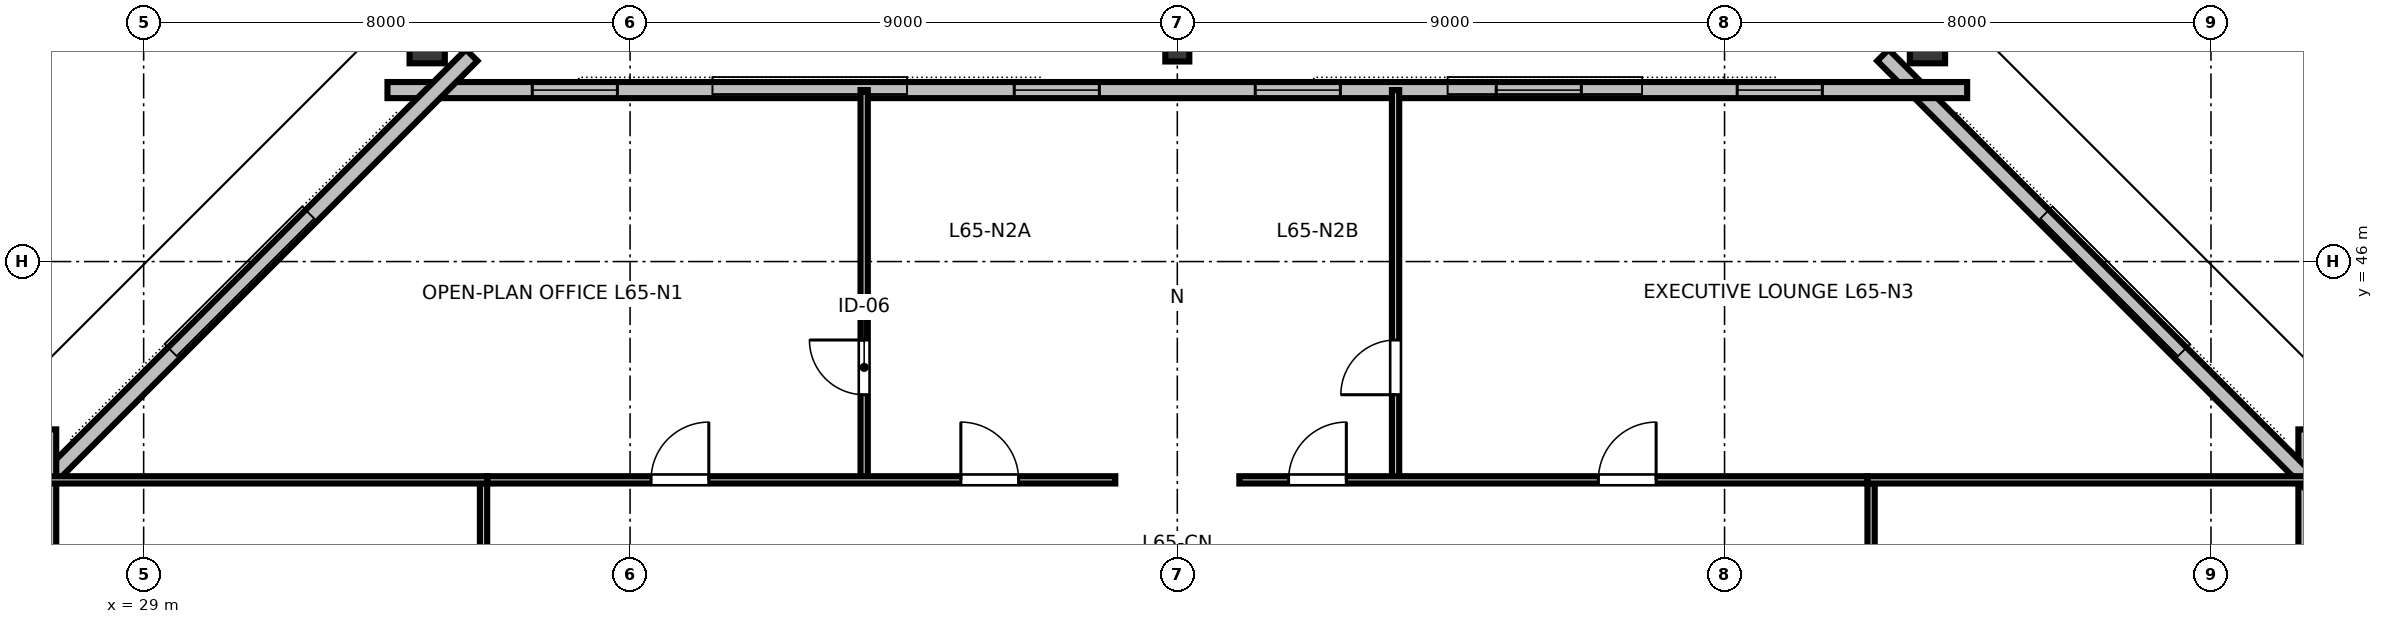
"""IFC4 building model, lengths in metres.
Left out: names, types, materials, properties, quantities, classifications, styles, units other than length and angle.
Written with IfcOpenShell. Run it as: python <this file> out.ifc"""

import sys

from ifc_helpers import new_model, si_unit, direction, frame, frame_2d, origin, origin_2d, place, context, subcontext, project, spatial, rectangle, hollow_rectangle, i_section, extrude, element, fill, save


model = new_model("IFC4")
c1 = context("Model", 3, precision=1e-05, world=origin(), true_north=direction((0.0, 1.0)))
c2 = subcontext(c1, "Body", "Model", "MODEL_VIEW")
j1 = project(units=[si_unit("LENGTHUNIT", "METRE"), si_unit("PLANEANGLEUNIT", "RADIAN")], contexts=[c1])
p1 = place(None, origin())
s1 = spatial("IfcSite", under=j1, at=p1, CompositionType="ELEMENT")
p2 = place(p1, origin())
s2 = spatial("IfcBuilding", under=s1, at=p2, CompositionType="ELEMENT")
p3 = place(p2, frame((0.0, 0.0, 246.6)))
s3 = spatial("IfcBuildingStorey", under=s2, at=p3, CompositionType="ELEMENT", Elevation=246.6)
p4 = place(p3, frame((65.32, 42.652, 0.0), z_axis=(-0.177670579794, -0.155655183327, 0.971701923935), x_axis=(0.730885754555, 0.640320734295, 0.236210438002)))
e1 = element("IfcColumn", 1, at=p4, inside=s3, PredefinedType="COLUMN", context=c2, shape_type="SweptSolid", body=[
    extrude(hollow_rectangle(XDim=0.58, YDim=0.7, WallThickness=0.032, at=origin_2d()), origin(), (0.0, 0.0, 1.0), 3.471),
])
p5 = place(p3, frame((58.337, 49.61, 0.0), z_axis=(-0.205244558331, -0.127417395213, 0.970381099709), x_axis=(0.527435237424, -0.849595239113, 0.0)))
e2 = element("IfcColumn", 2, at=p5, inside=s3, PredefinedType="COLUMN", context=c2, shape_type="SweptSolid", body=[
    extrude(hollow_rectangle(XDim=0.58, YDim=0.7, WallThickness=0.032, at=origin_2d()), origin(), (0.0, 0.0, 1.0), 3.476),
])
p6 = place(p3, frame((46.0, 49.48, 0.0), z_axis=(0.0, -0.128283388035, 0.991737552155), x_axis=(1.0, 0.0, 0.0)))
e3 = element("IfcColumn", 3, at=p6, inside=s3, PredefinedType="COLUMN", context=c2, shape_type="SweptSolid", body=[
    extrude(i_section(OverallWidth=0.395, OverallDepth=0.38, WebThickness=0.019, FlangeThickness=0.03, FilletRadius=0.025, at=origin_2d()), origin(), (0.0, 0.0, 1.0), 3.401),
])
p7 = place(p3, frame((33.663, 49.61, 0.0), z_axis=(0.205244558331, -0.127417395213, 0.970381099709), x_axis=(0.527435237424, 0.849595239113, 0.0)))
e4 = element("IfcColumn", 4, at=p7, inside=s3, PredefinedType="COLUMN", context=c2, shape_type="SweptSolid", body=[
    extrude(hollow_rectangle(XDim=0.58, YDim=0.7, WallThickness=0.032, at=origin_2d()), origin(), (0.0, 0.0, 1.0), 3.476),
])
p8 = place(p3, frame((26.68, 42.652, 0.0), z_axis=(0.177670579794, -0.155655183327, 0.971701923935), x_axis=(-0.730885754555, 0.640320734295, 0.236210438002)))
e5 = element("IfcColumn", 5, at=p8, inside=s3, PredefinedType="COLUMN", context=c2, shape_type="SweptSolid", body=[
    extrude(hollow_rectangle(XDim=0.58, YDim=0.7, WallThickness=0.032, at=origin_2d()), origin(), (0.0, 0.0, 1.0), 3.471),
])
p9 = place(p3, frame((64.57, 20.76, 0.0), z_axis=(0.0, 0.0, 1.0), x_axis=(0.0, 1.0, 0.0)))
e6 = element("IfcWall", 6, at=p9, inside=s3, PredefinedType="STANDARD", context=c2, shape_type="SweptSolid", body=[
    extrude(rectangle(XDim=22.48, YDim=0.265, at=frame_2d((11.24, 0.0))), origin(), (0.0, 0.0, 1.0), 2.832),
])
p10 = place(p9, frame((2.428, 0.0, 0.85)))
e7 = element("IfcOpeningElement", 7, at=p10, cuts=e6, PredefinedType="OPENING", context=c2, shape_type="SweptSolid", body=[
    extrude(rectangle(XDim=1.4, YDim=1.2, at=frame_2d((0.7, 0.6))), frame((0.0, 0.142, 0.0), z_axis=(0.0, -1.0, 0.0), x_axis=(1.0, 0.0, 0.0)), (0.0, 0.0, 1.0), 0.285),
])
p11 = place(p9, frame((6.484, 0.0, 0.85)))
e8 = element("IfcOpeningElement", 8, at=p11, cuts=e6, PredefinedType="OPENING", context=c2, shape_type="SweptSolid", body=[
    extrude(rectangle(XDim=1.4, YDim=1.2, at=frame_2d((0.7, 0.6))), frame((0.0, 0.142, 0.0), z_axis=(0.0, -1.0, 0.0), x_axis=(1.0, 0.0, 0.0)), (0.0, 0.0, 1.0), 0.285),
])
p12 = place(p9, frame((14.596, 0.0, 0.85)))
e9 = element("IfcOpeningElement", 9, at=p12, cuts=e6, PredefinedType="OPENING", context=c2, shape_type="SweptSolid", body=[
    extrude(rectangle(XDim=1.4, YDim=1.2, at=frame_2d((0.7, 0.6))), frame((0.0, 0.142, 0.0), z_axis=(0.0, -1.0, 0.0), x_axis=(1.0, 0.0, 0.0)), (0.0, 0.0, 1.0), 0.285),
])
p13 = place(p9, frame((18.652, 0.0, 0.85)))
e10 = element("IfcOpeningElement", 10, at=p13, cuts=e6, PredefinedType="OPENING", context=c2, shape_type="SweptSolid", body=[
    extrude(rectangle(XDim=1.4, YDim=1.2, at=frame_2d((0.7, 0.6))), frame((0.0, 0.142, 0.0), z_axis=(0.0, -1.0, 0.0), x_axis=(1.0, 0.0, 0.0)), (0.0, 0.0, 1.0), 0.285),
])
p14 = place(p3, frame((65.144, 41.854, 0.0), z_axis=(0.0, 0.0, 1.0), x_axis=(-0.707106781187, 0.707106781187, 0.0)))
e11 = element("IfcWall", 11, at=p14, inside=s3, PredefinedType="STANDARD", context=c2, shape_type="SweptSolid", body=[
    extrude(rectangle(XDim=10.662, YDim=0.265, at=frame_2d((5.331, 0.0))), origin(), (0.0, 0.0, 1.0), 2.832),
])
p15 = place(p3, frame((58.99, 48.82, 0.0), z_axis=(0.0, 0.0, 1.0), x_axis=(-1.0, 0.0, 0.0)))
e12 = element("IfcWall", 12, at=p15, inside=s3, PredefinedType="STANDARD", context=c2, shape_type="SweptSolid", body=[
    extrude(rectangle(XDim=25.98, YDim=0.265, at=frame_2d((12.99, 0.0))), origin(), (0.0, 0.0, 1.0), 2.832),
])
p16 = place(p15, frame((2.382, 0.0, 0.85)))
e13 = element("IfcOpeningElement", 13, at=p16, cuts=e12, PredefinedType="OPENING", context=c2, shape_type="SweptSolid", body=[
    extrude(rectangle(XDim=1.4, YDim=1.2, at=frame_2d((0.7, 0.6))), frame((0.0, 0.142, 0.0), z_axis=(0.0, -1.0, 0.0), x_axis=(1.0, 0.0, 0.0)), (0.0, 0.0, 1.0), 0.285),
])
p17 = place(p15, frame((6.345, 0.0, 0.85)))
e14 = element("IfcOpeningElement", 14, at=p17, cuts=e12, PredefinedType="OPENING", context=c2, shape_type="SweptSolid", body=[
    extrude(rectangle(XDim=1.4, YDim=1.2, at=frame_2d((0.7, 0.6))), frame((0.0, 0.142, 0.0), z_axis=(0.0, -1.0, 0.0), x_axis=(1.0, 0.0, 0.0)), (0.0, 0.0, 1.0), 0.285),
])
p18 = place(p15, frame((10.308, 0.0, 0.85)))
e15 = element("IfcOpeningElement", 15, at=p18, cuts=e12, PredefinedType="OPENING", context=c2, shape_type="SweptSolid", body=[
    extrude(rectangle(XDim=1.4, YDim=1.2, at=frame_2d((0.7, 0.6))), frame((0.0, 0.142, 0.0), z_axis=(0.0, -1.0, 0.0), x_axis=(1.0, 0.0, 0.0)), (0.0, 0.0, 1.0), 0.285),
])
p19 = place(p15, frame((14.272, 0.0, 0.85)))
e16 = element("IfcOpeningElement", 16, at=p19, cuts=e12, PredefinedType="OPENING", context=c2, shape_type="SweptSolid", body=[
    extrude(rectangle(XDim=1.4, YDim=1.2, at=frame_2d((0.7, 0.6))), frame((0.0, 0.142, 0.0), z_axis=(0.0, -1.0, 0.0), x_axis=(1.0, 0.0, 0.0)), (0.0, 0.0, 1.0), 0.285),
])
p20 = place(p15, frame((22.198, 0.0, 0.85)))
e17 = element("IfcOpeningElement", 17, at=p20, cuts=e12, PredefinedType="OPENING", context=c2, shape_type="SweptSolid", body=[
    extrude(rectangle(XDim=1.4, YDim=1.2, at=frame_2d((0.7, 0.6))), frame((0.0, 0.142, 0.0), z_axis=(0.0, -1.0, 0.0), x_axis=(1.0, 0.0, 0.0)), (0.0, 0.0, 1.0), 0.285),
])
p21 = place(p3, frame((34.396, 49.394, 0.0), z_axis=(0.0, 0.0, 1.0), x_axis=(-0.707106781187, -0.707106781187, 0.0)))
e18 = element("IfcWall", 18, at=p21, inside=s3, PredefinedType="STANDARD", context=c2, shape_type="SweptSolid", body=[
    extrude(rectangle(XDim=10.662, YDim=0.265, at=frame_2d((5.331, 0.0))), origin(), (0.0, 0.0, 1.0), 2.832),
])
p22 = place(p3, frame((27.43, 43.24, 0.0), z_axis=(0.0, 0.0, 1.0), x_axis=(0.0, -1.0, 0.0)))
e19 = element("IfcWall", 19, at=p22, inside=s3, PredefinedType="STANDARD", context=c2, shape_type="SweptSolid", body=[
    extrude(rectangle(XDim=22.48, YDim=0.265, at=frame_2d((11.24, 0.0))), origin(), (0.0, 0.0, 1.0), 2.832),
])
p23 = place(p22, frame((2.428, 0.0, 0.85)))
e20 = element("IfcOpeningElement", 20, at=p23, cuts=e19, PredefinedType="OPENING", context=c2, shape_type="SweptSolid", body=[
    extrude(rectangle(XDim=1.4, YDim=1.2, at=frame_2d((0.7, 0.6))), frame((0.0, 0.142, 0.0), z_axis=(0.0, -1.0, 0.0), x_axis=(1.0, 0.0, 0.0)), (0.0, 0.0, 1.0), 0.285),
])
p24 = place(p22, frame((6.484, 0.0, 0.85)))
e21 = element("IfcOpeningElement", 21, at=p24, cuts=e19, PredefinedType="OPENING", context=c2, shape_type="SweptSolid", body=[
    extrude(rectangle(XDim=1.4, YDim=1.2, at=frame_2d((0.7, 0.6))), frame((0.0, 0.142, 0.0), z_axis=(0.0, -1.0, 0.0), x_axis=(1.0, 0.0, 0.0)), (0.0, 0.0, 1.0), 0.285),
])
p25 = place(p22, frame((14.596, 0.0, 0.85)))
e22 = element("IfcOpeningElement", 22, at=p25, cuts=e19, PredefinedType="OPENING", context=c2, shape_type="SweptSolid", body=[
    extrude(rectangle(XDim=1.4, YDim=1.2, at=frame_2d((0.7, 0.6))), frame((0.0, 0.142, 0.0), z_axis=(0.0, -1.0, 0.0), x_axis=(1.0, 0.0, 0.0)), (0.0, 0.0, 1.0), 0.285),
])
p26 = place(p22, frame((18.652, 0.0, 0.85)))
e23 = element("IfcOpeningElement", 23, at=p26, cuts=e19, PredefinedType="OPENING", context=c2, shape_type="SweptSolid", body=[
    extrude(rectangle(XDim=1.4, YDim=1.2, at=frame_2d((0.7, 0.6))), frame((0.0, 0.142, 0.0), z_axis=(0.0, -1.0, 0.0), x_axis=(1.0, 0.0, 0.0)), (0.0, 0.0, 1.0), 0.285),
])
p27 = place(p3, frame((40.85, 42.41, 0.0), z_axis=(0.0, 0.0, 1.0), x_axis=(0.0, 1.0, 0.0)))
e24 = element("IfcWall", 24, at=p27, inside=s3, PredefinedType="PARTITIONING", context=c2, shape_type="SweptSolid", body=[
    extrude(rectangle(XDim=6.41, YDim=0.12, at=frame_2d((3.205, 0.0))), origin(), (0.0, 0.0, 1.0), 2.655),
])
p28 = place(p27, frame((1.4, 0.0, 0.0)))
e25 = element("IfcOpeningElement", 25, at=p28, cuts=e24, PredefinedType="OPENING", context=c2, shape_type="SweptSolid", body=[
    extrude(rectangle(XDim=0.9, YDim=2.15, at=frame_2d((0.45, 1.075))), frame((0.0, 0.07, 0.0), z_axis=(0.0, -1.0, 0.0), x_axis=(1.0, 0.0, 0.0)), (0.0, 0.0, 1.0), 0.14),
])
p29 = place(p3, frame((49.59, 42.41, 0.0), z_axis=(0.0, 0.0, 1.0), x_axis=(0.0, 1.0, 0.0)))
e26 = element("IfcWall", 26, at=p29, inside=s3, PredefinedType="PARTITIONING", context=c2, shape_type="SweptSolid", body=[
    extrude(rectangle(XDim=6.41, YDim=0.12, at=frame_2d((3.205, 0.0))), origin(), (0.0, 0.0, 1.0), 2.655),
])
p30 = place(p29, frame((1.4, 0.0, 0.0)))
e27 = element("IfcOpeningElement", 27, at=p30, cuts=e26, PredefinedType="OPENING", context=c2, shape_type="SweptSolid", body=[
    extrude(rectangle(XDim=0.9, YDim=2.15, at=frame_2d((0.45, 1.075))), frame((0.0, 0.07, 0.0), z_axis=(0.0, -1.0, 0.0), x_axis=(1.0, 0.0, 0.0)), (0.0, 0.0, 1.0), 0.14),
])
p31 = place(p3, frame((34.65, 42.41, 0.0), z_axis=(0.0, 0.0, 1.0), x_axis=(1.0, 0.0, 0.0)))
e28 = element("IfcWall", 28, at=p31, inside=s3, PredefinedType="PARTITIONING", context=c2, shape_type="SweptSolid", body=[
    extrude(rectangle(XDim=10.33, YDim=0.12, at=frame_2d((5.165, 0.0))), origin(), (0.0, 0.0, 1.0), 2.655),
])
p32 = place(p31, frame((2.695, 0.0, 0.0)))
e29 = element("IfcOpeningElement", 29, at=p32, cuts=e28, PredefinedType="OPENING", context=c2, shape_type="SweptSolid", body=[
    extrude(rectangle(XDim=0.95, YDim=2.15, at=frame_2d((0.475, 1.075))), frame((0.0, 0.07, 0.0), z_axis=(0.0, -1.0, 0.0), x_axis=(1.0, 0.0, 0.0)), (0.0, 0.0, 1.0), 0.14),
])
p33 = place(p31, frame((7.79, 0.0, 0.0)))
e30 = element("IfcOpeningElement", 30, at=p33, cuts=e28, PredefinedType="OPENING", context=c2, shape_type="SweptSolid", body=[
    extrude(rectangle(XDim=0.95, YDim=2.15, at=frame_2d((0.475, 1.075))), frame((0.0, 0.07, 0.0), z_axis=(0.0, -1.0, 0.0), x_axis=(1.0, 0.0, 0.0)), (0.0, 0.0, 1.0), 0.14),
])
p34 = place(p3, frame((47.02, 42.41, 0.0), z_axis=(0.0, 0.0, 1.0), x_axis=(1.0, 0.0, 0.0)))
e31 = element("IfcWall", 31, at=p34, inside=s3, PredefinedType="PARTITIONING", context=c2, shape_type="SweptSolid", body=[
    extrude(rectangle(XDim=10.33, YDim=0.12, at=frame_2d((5.165, 0.0))), origin(), (0.0, 0.0, 1.0), 2.655),
])
p35 = place(p34, frame((0.81, 0.0, 0.0)))
e32 = element("IfcOpeningElement", 32, at=p35, cuts=e31, PredefinedType="OPENING", context=c2, shape_type="SweptSolid", body=[
    extrude(rectangle(XDim=0.95, YDim=2.15, at=frame_2d((0.475, 1.075))), frame((0.0, 0.07, 0.0), z_axis=(0.0, -1.0, 0.0), x_axis=(1.0, 0.0, 0.0)), (0.0, 0.0, 1.0), 0.14),
])
p36 = place(p34, frame((5.905, 0.0, 0.0)))
e33 = element("IfcOpeningElement", 33, at=p36, cuts=e31, PredefinedType="OPENING", context=c2, shape_type="SweptSolid", body=[
    extrude(rectangle(XDim=0.95, YDim=2.15, at=frame_2d((0.475, 1.075))), frame((0.0, 0.07, 0.0), z_axis=(0.0, -1.0, 0.0), x_axis=(1.0, 0.0, 0.0)), (0.0, 0.0, 1.0), 0.14),
])
p37 = place(p3, frame((34.59, 21.65, 0.0), z_axis=(0.0, 0.0, 1.0), x_axis=(0.0, 1.0, 0.0)))
e34 = element("IfcWall", 34, at=p37, inside=s3, PredefinedType="PARTITIONING", context=c2, shape_type="SweptSolid", body=[
    extrude(rectangle(XDim=20.7, YDim=0.12, at=frame_2d((10.35, 0.0))), origin(), (0.0, 0.0, 1.0), 2.655),
])
p38 = place(p37, frame((4.26, 0.0, 0.0)))
e35 = element("IfcOpeningElement", 35, at=p38, cuts=e34, PredefinedType="OPENING", context=c2, shape_type="SweptSolid", body=[
    extrude(rectangle(XDim=0.95, YDim=2.15, at=frame_2d((0.475, 1.075))), frame((0.0, 0.07, 0.0), z_axis=(0.0, -1.0, 0.0), x_axis=(1.0, 0.0, 0.0)), (0.0, 0.0, 1.0), 0.14),
])
p39 = place(p37, frame((14.411, 0.0, 0.0)))
e36 = element("IfcOpeningElement", 36, at=p39, cuts=e34, PredefinedType="OPENING", context=c2, shape_type="SweptSolid", body=[
    extrude(rectangle(XDim=0.95, YDim=2.15, at=frame_2d((0.475, 1.075))), frame((0.0, 0.07, 0.0), z_axis=(0.0, -1.0, 0.0), x_axis=(1.0, 0.0, 0.0)), (0.0, 0.0, 1.0), 0.14),
])
p40 = place(p3, frame((57.41, 21.65, 0.0), z_axis=(0.0, 0.0, 1.0), x_axis=(0.0, 1.0, 0.0)))
e37 = element("IfcWall", 37, at=p40, inside=s3, PredefinedType="PARTITIONING", context=c2, shape_type="SweptSolid", body=[
    extrude(rectangle(XDim=20.7, YDim=0.12, at=frame_2d((10.35, 0.0))), origin(), (0.0, 0.0, 1.0), 2.655),
])
p41 = place(p40, frame((9.875, 0.0, 0.0)))
e38 = element("IfcOpeningElement", 38, at=p41, cuts=e37, PredefinedType="OPENING", context=c2, shape_type="SweptSolid", body=[
    extrude(rectangle(XDim=0.95, YDim=2.15, at=frame_2d((0.475, 1.075))), frame((0.0, 0.07, 0.0), z_axis=(0.0, -1.0, 0.0), x_axis=(1.0, 0.0, 0.0)), (0.0, 0.0, 1.0), 0.14),
])
for number, where, z_axis, x_axis in (
    (39, (34.65, 42.41, 0.0), (0.0, 0.0, 1.0), (-1.0, 0.0, 0.0)),
    (40, (57.35, 42.41, 0.0), (0.0, 0.0, 1.0), (1.0, 0.0, 0.0)),
):
    element("IfcWall", number, at=place(p3, frame(where, z_axis=z_axis, x_axis=x_axis)), inside=s3, PredefinedType="PARTITIONING", context=c2, shape_type="SweptSolid", body=[
        extrude(rectangle(XDim=7.22, YDim=0.12, at=frame_2d((3.61, 0.0))), origin(), (0.0, 0.0, 1.0), 2.655),
    ])
p42 = place(p16, origin())
e41 = element("IfcWindow", 41, at=p42, inside=s3, PartitioningType="SINGLE_PANEL", PredefinedType="WINDOW", context=c2, shape_type="SweptSolid", body=[
    extrude(rectangle(XDim=1.4, YDim=1.2, at=frame_2d((0.7, 0.6))), frame((0.0, 0.03, 0.0), z_axis=(0.0, -1.0, 0.0), x_axis=(1.0, 0.0, 0.0)), (0.0, 0.0, 1.0), 0.06),
])
fill(e13, e41)
p43 = place(p17, origin())
e42 = element("IfcWindow", 42, at=p43, inside=s3, PartitioningType="SINGLE_PANEL", PredefinedType="WINDOW", context=c2, shape_type="SweptSolid", body=[
    extrude(rectangle(XDim=1.4, YDim=1.2, at=frame_2d((0.7, 0.6))), frame((0.0, 0.03, 0.0), z_axis=(0.0, -1.0, 0.0), x_axis=(1.0, 0.0, 0.0)), (0.0, 0.0, 1.0), 0.06),
])
fill(e14, e42)
p44 = place(p18, origin())
e43 = element("IfcWindow", 43, at=p44, inside=s3, PartitioningType="SINGLE_PANEL", PredefinedType="WINDOW", context=c2, shape_type="SweptSolid", body=[
    extrude(rectangle(XDim=1.4, YDim=1.2, at=frame_2d((0.7, 0.6))), frame((0.0, 0.03, 0.0), z_axis=(0.0, -1.0, 0.0), x_axis=(1.0, 0.0, 0.0)), (0.0, 0.0, 1.0), 0.06),
])
fill(e15, e43)
p45 = place(p19, origin())
e44 = element("IfcWindow", 44, at=p45, inside=s3, PartitioningType="SINGLE_PANEL", PredefinedType="WINDOW", context=c2, shape_type="SweptSolid", body=[
    extrude(rectangle(XDim=1.4, YDim=1.2, at=frame_2d((0.7, 0.6))), frame((0.0, 0.03, 0.0), z_axis=(0.0, -1.0, 0.0), x_axis=(1.0, 0.0, 0.0)), (0.0, 0.0, 1.0), 0.06),
])
fill(e16, e44)
p46 = place(p20, origin())
e45 = element("IfcWindow", 45, at=p46, inside=s3, PartitioningType="SINGLE_PANEL", PredefinedType="WINDOW", context=c2, shape_type="SweptSolid", body=[
    extrude(rectangle(XDim=1.4, YDim=1.2, at=frame_2d((0.7, 0.6))), frame((0.0, 0.03, 0.0), z_axis=(0.0, -1.0, 0.0), x_axis=(1.0, 0.0, 0.0)), (0.0, 0.0, 1.0), 0.06),
])
fill(e17, e45)
p47 = place(p28, origin())
e46 = element("IfcDoor", 46, at=p47, inside=s3, OperationType="SINGLE_SWING_RIGHT", PredefinedType="DOOR", context=c2, shape_type="SweptSolid", body=[
    extrude(rectangle(XDim=0.9, YDim=2.15, at=frame_2d((0.45, 1.075))), frame((0.0, 0.025, 0.0), z_axis=(0.0, -1.0, 0.0), x_axis=(1.0, 0.0, 0.0)), (0.0, 0.0, 1.0), 0.05),
])
fill(e25, e46)
p48 = place(p30, origin())
e47 = element("IfcDoor", 47, at=p48, inside=s3, OperationType="SINGLE_SWING_LEFT", PredefinedType="DOOR", context=c2, shape_type="SweptSolid", body=[
    extrude(rectangle(XDim=0.9, YDim=2.15, at=frame_2d((0.45, 1.075))), frame((0.0, 0.025, 0.0), z_axis=(0.0, -1.0, 0.0), x_axis=(1.0, 0.0, 0.0)), (0.0, 0.0, 1.0), 0.05),
])
fill(e27, e47)
p49 = place(p32, origin())
e48 = element("IfcDoor", 48, at=p49, inside=s3, OperationType="SINGLE_SWING_RIGHT", PredefinedType="DOOR", context=c2, shape_type="SweptSolid", body=[
    extrude(rectangle(XDim=0.95, YDim=2.15, at=frame_2d((0.475, 1.075))), frame((0.0, 0.025, 0.0), z_axis=(0.0, -1.0, 0.0), x_axis=(1.0, 0.0, 0.0)), (0.0, 0.0, 1.0), 0.05),
])
fill(e29, e48)
p50 = place(p33, origin())
e49 = element("IfcDoor", 49, at=p50, inside=s3, OperationType="SINGLE_SWING_LEFT", PredefinedType="DOOR", context=c2, shape_type="SweptSolid", body=[
    extrude(rectangle(XDim=0.95, YDim=2.15, at=frame_2d((0.475, 1.075))), frame((0.0, 0.025, 0.0), z_axis=(0.0, -1.0, 0.0), x_axis=(1.0, 0.0, 0.0)), (0.0, 0.0, 1.0), 0.05),
])
fill(e30, e49)
p51 = place(p35, origin())
e50 = element("IfcDoor", 50, at=p51, inside=s3, OperationType="SINGLE_SWING_RIGHT", PredefinedType="DOOR", context=c2, shape_type="SweptSolid", body=[
    extrude(rectangle(XDim=0.95, YDim=2.15, at=frame_2d((0.475, 1.075))), frame((0.0, 0.025, 0.0), z_axis=(0.0, -1.0, 0.0), x_axis=(1.0, 0.0, 0.0)), (0.0, 0.0, 1.0), 0.05),
])
fill(e32, e50)
p52 = place(p36, origin())
e51 = element("IfcDoor", 51, at=p52, inside=s3, OperationType="SINGLE_SWING_RIGHT", PredefinedType="DOOR", context=c2, shape_type="SweptSolid", body=[
    extrude(rectangle(XDim=0.95, YDim=2.15, at=frame_2d((0.475, 1.075))), frame((0.0, 0.025, 0.0), z_axis=(0.0, -1.0, 0.0), x_axis=(1.0, 0.0, 0.0)), (0.0, 0.0, 1.0), 0.05),
])
fill(e33, e51)
save(model, sys.argv[1])
